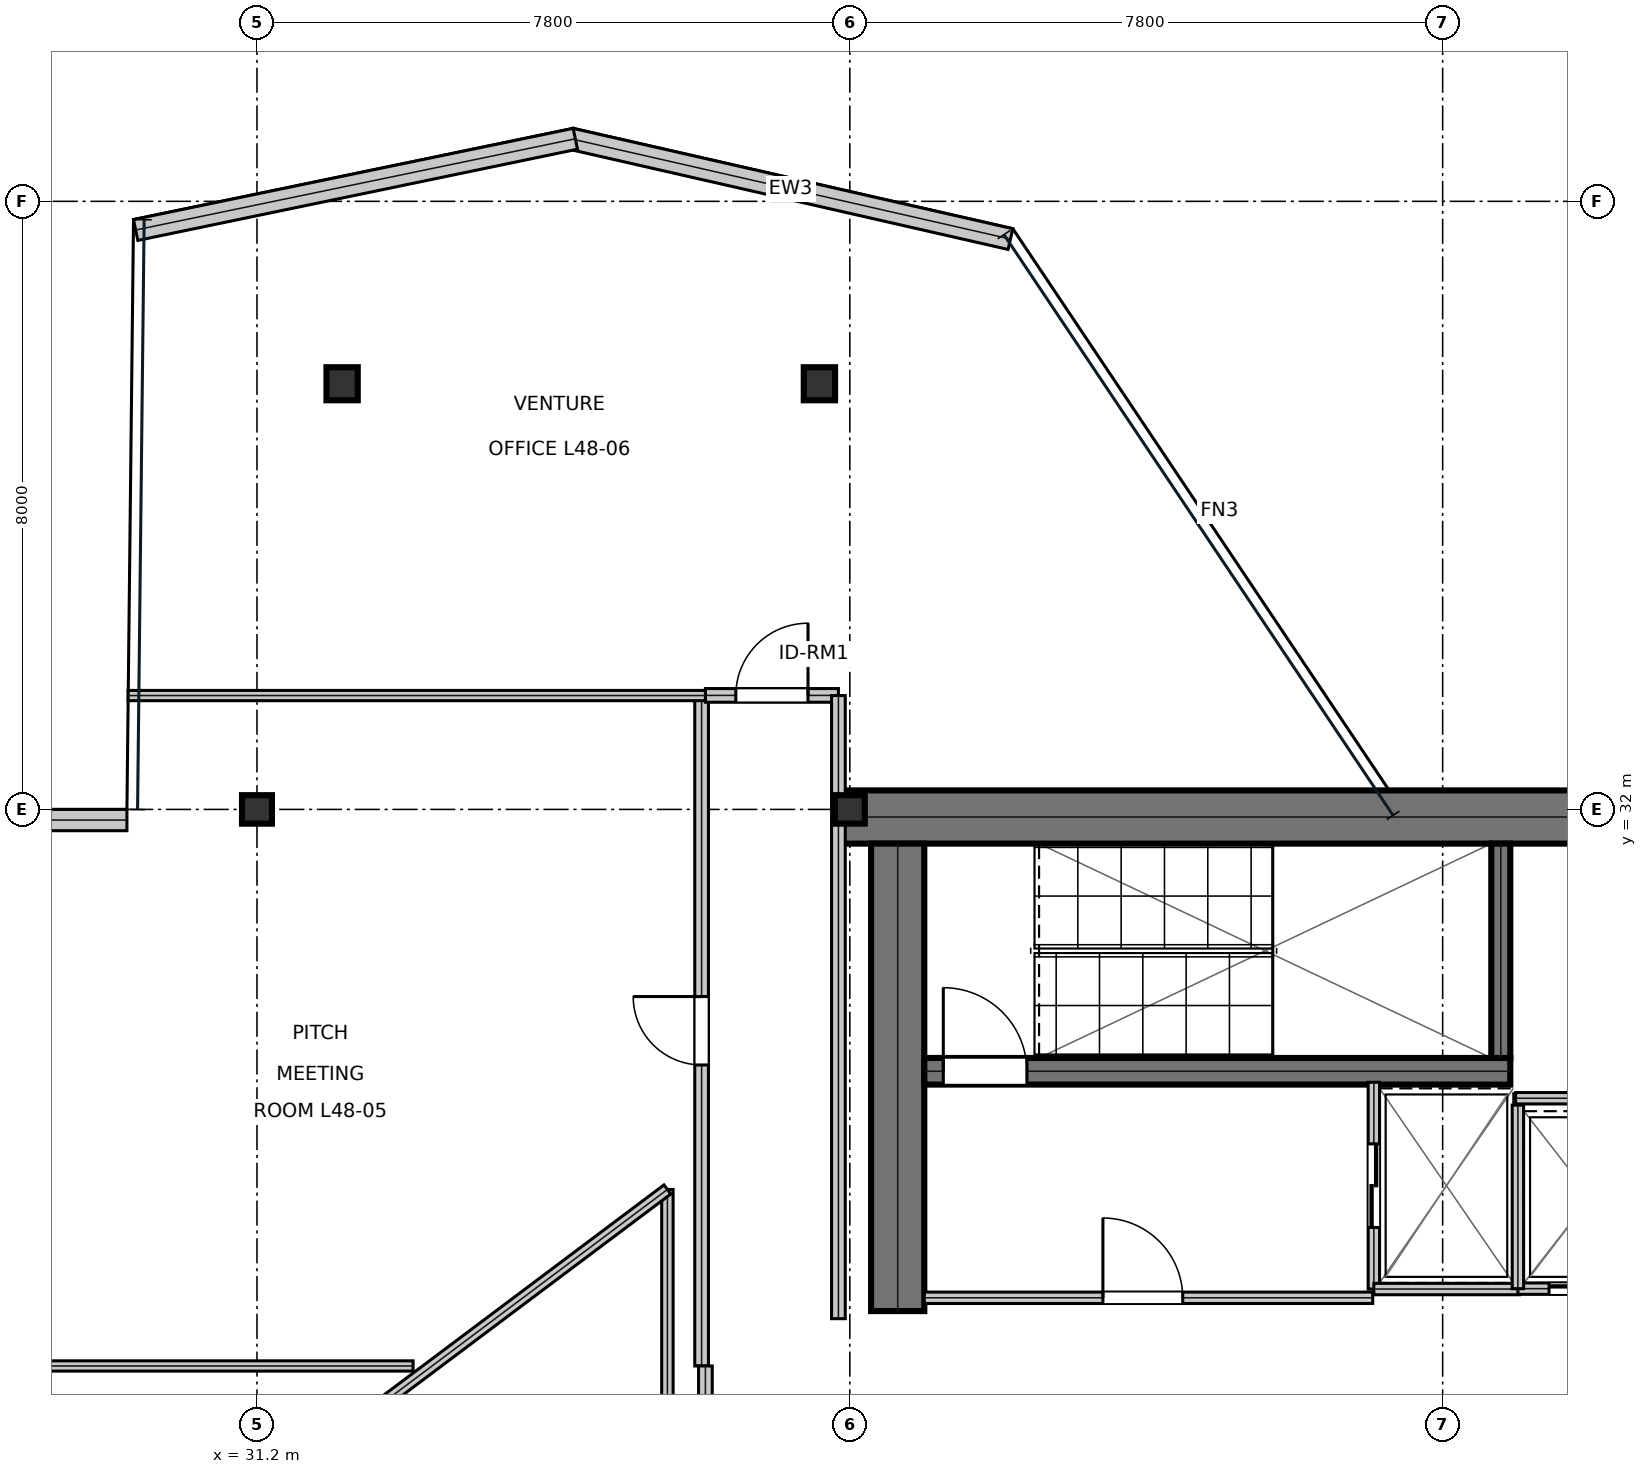
"""IFC4 building model, lengths in metres.
Left out: names, types, materials, properties, quantities, classifications, styles, units other than length and angle.
Written with IfcOpenShell. Run it as: python <this file> out.ifc"""

import sys

from ifc_helpers import new_model, si_unit, direction, frame, frame_2d, origin, origin_2d, place, context, subcontext, project, spatial, rectangle, i_section, extrude, element, fill, save


model = new_model("IFC4")
c1 = context("Model", 3, precision=1e-05, world=origin(), true_north=direction((0.0, 1.0)))
c2 = subcontext(c1, "Body", "Model", "MODEL_VIEW")
j1 = project(units=[si_unit("LENGTHUNIT", "METRE"), si_unit("PLANEANGLEUNIT", "RADIAN")], contexts=[c1])
p1 = place(None, origin())
s1 = spatial("IfcSite", under=j1, at=p1, CompositionType="ELEMENT")
p2 = place(p1, origin())
s2 = spatial("IfcBuilding", under=s1, at=p2, CompositionType="ELEMENT")
p3 = place(p2, frame((0.0, 0.0, 208.05)))
s3 = spatial("IfcBuildingStorey", under=s2, at=p3, CompositionType="ELEMENT", Elevation=208.05)
p4 = place(p3, frame((38.8, 31.9, 0.0), z_axis=(0.0, 0.0, 1.0), x_axis=(1.0, 0.0, 0.0)))
e1 = element("IfcWall", 1, at=p4, inside=s3, PredefinedType="SHEAR", context=c2, shape_type="SweptSolid", body=[
    extrude(rectangle(XDim=16.0, YDim=0.7, at=frame_2d((8.0, 0.0))), origin(), (0.0, 0.0, 1.0), 3.79),
])
p5 = place(p3, frame((39.63, 25.4, 0.0), z_axis=(0.0, 0.0, 1.0), x_axis=(0.0, 1.0, 0.0)))
e2 = element("IfcWall", 2, at=p5, inside=s3, PredefinedType="SHEAR", context=c2, shape_type="SweptSolid", body=[
    extrude(rectangle(XDim=6.15, YDim=0.7, at=frame_2d((3.075, 0.0))), origin(), (0.0, 0.0, 1.0), 3.79),
])
p6 = place(p3, frame((39.98, 28.555, 0.0), z_axis=(0.0, 0.0, 1.0), x_axis=(1.0, 0.0, 0.0)))
e3 = element("IfcWall", 3, at=p6, inside=s3, PredefinedType="SHEAR", context=c2, shape_type="SweptSolid", body=[
    extrude(rectangle(XDim=7.71, YDim=0.35, at=frame_2d((3.855, 0.0))), origin(), (0.0, 0.0, 1.0), 3.79),
])
p7 = place(p6, frame((0.25, 0.0, 0.0)))
e4 = element("IfcOpeningElement", 4, at=p7, cuts=e3, PredefinedType="OPENING", context=c2, shape_type="SweptSolid", body=[
    extrude(rectangle(XDim=1.1, YDim=2.15, at=frame_2d((0.55, 1.075))), frame((0.0, 0.185, 0.0), z_axis=(0.0, -1.0, 0.0), x_axis=(1.0, 0.0, 0.0)), (0.0, 0.0, 1.0), 0.37),
])
p8 = place(p3, frame((47.565, 28.73, 0.0), z_axis=(0.0, 0.0, 1.0), x_axis=(0.0, 1.0, 0.0)))
e5 = element("IfcWall", 5, at=p8, inside=s3, PredefinedType="SHEAR", context=c2, shape_type="SweptSolid", body=[
    extrude(rectangle(XDim=2.82, YDim=0.25, at=frame_2d((1.41, 0.0))), origin(), (0.0, 0.0, 1.0), 3.79),
])
for number, where, z_axis, x_axis in (
    (6, (31.2, 32.0, 0.0), (0.0, 0.0, 1.0), (1.0, 0.0, 0.0)),
    (7, (39.0, 32.0, 0.0), (0.0, 0.0, 1.0), (1.0, 0.0, 0.0)),
):
    element("IfcColumn", number, at=place(p3, frame(where, z_axis=z_axis, x_axis=x_axis)), inside=s3, PredefinedType="COLUMN", context=c2, shape_type="SweptSolid", body=[
        extrude(i_section(OverallWidth=0.394, OverallDepth=0.375, WebThickness=0.017, FlangeThickness=0.028, at=origin_2d()), origin(), (0.0, 0.0, 1.0), 4.044),
    ])
for number, where, z_axis, x_axis in (
    (8, (32.32, 37.6, 0.016), (0.0, 0.0, 1.0), (1.0, 0.0, 0.0)),
    (9, (38.6, 37.6, 0.016), (0.0, 0.0, 1.0), (1.0, 0.0, 0.0)),
):
    element("IfcColumn", number, at=place(p3, frame(where, z_axis=z_axis, x_axis=x_axis)), inside=s3, PredefinedType="COLUMN", context=c2, shape_type="SweptSolid", body=[
        extrude(i_section(OverallWidth=0.412, OverallDepth=0.435, WebThickness=0.036, FlangeThickness=0.058, at=origin_2d()), origin(), (0.0, 0.0, 1.0), 4.018),
    ])
p9 = place(p3, frame((41.113, 39.503, 0.0), z_axis=(0.0, 0.0, 1.0), x_axis=(-0.974934808954, 0.222490715064, 0.0)))
e10 = element("IfcWall", 10, at=p9, inside=s3, PredefinedType="STANDARD", context=c2, shape_type="SweptSolid", body=[
    extrude(rectangle(XDim=5.933, YDim=0.28, at=frame_2d((2.967, 0.0))), origin(), (0.0, 0.0, 1.0), 3.79),
])
p10 = place(p3, frame((35.388, 40.823, 0.0), z_axis=(0.0, 0.0, 1.0), x_axis=(-0.979145472124, -0.203160390873, 0.0)))
e11 = element("IfcWall", 11, at=p10, inside=s3, PredefinedType="STANDARD", context=c2, shape_type="SweptSolid", body=[
    extrude(rectangle(XDim=5.908, YDim=0.28, at=frame_2d((2.954, 0.0))), origin(), (0.0, 0.0, 1.0), 3.79),
])
p11 = place(p3, frame((29.489, 31.86, 0.0), z_axis=(0.0, 0.0, 1.0), x_axis=(-1.0, 0.0, 0.0)))
e12 = element("IfcWall", 12, at=p11, inside=s3, PredefinedType="STANDARD", context=c2, shape_type="SweptSolid", body=[
    extrude(rectangle(XDim=2.809, YDim=0.28, at=frame_2d((1.405, 0.0))), origin(), (0.0, 0.0, 1.0), 3.79),
])
p12 = place(p3, frame((39.98, 25.575, 0.0), z_axis=(0.0, 0.0, 1.0), x_axis=(1.0, 0.0, 0.0)))
e13 = element("IfcWall", 13, at=p12, inside=s3, PredefinedType="PARTITIONING", context=c2, shape_type="SweptSolid", body=[
    extrude(rectangle(XDim=5.9, YDim=0.15, at=frame_2d((2.95, 0.0))), origin(), (0.0, 0.0, 1.0), 3.79),
])
p13 = place(p12, frame((2.35, 0.0, 0.0)))
e14 = element("IfcOpeningElement", 14, at=p13, cuts=e13, PredefinedType="OPENING", context=c2, shape_type="SweptSolid", body=[
    extrude(rectangle(XDim=1.05, YDim=2.15, at=frame_2d((0.525, 1.075))), frame((0.0, 0.085, 0.0), z_axis=(0.0, -1.0, 0.0), x_axis=(1.0, 0.0, 0.0)), (0.0, 0.0, 1.0), 0.17),
])
p14 = place(p3, frame((45.895, 25.69, 0.0), z_axis=(0.0, 0.0, 1.0), x_axis=(0.0, 1.0, 0.0)))
e15 = element("IfcWall", 15, at=p14, inside=s3, PredefinedType="PARTITIONING", context=c2, shape_type="SweptSolid", body=[
    extrude(rectangle(XDim=2.72, YDim=0.15, at=frame_2d((1.36, 0.0))), origin(), (0.0, 0.0, 1.0), 3.79),
])
p15 = place(p14, frame((0.81, 0.0, 0.0)))
e16 = element("IfcOpeningElement", 16, at=p15, cuts=e15, PredefinedType="OPENING", context=c2, shape_type="SweptSolid", body=[
    extrude(rectangle(XDim=1.1, YDim=2.15, at=frame_2d((0.55, 1.075))), frame((0.0, 0.085, 0.0), z_axis=(0.0, -1.0, 0.0), x_axis=(1.0, 0.0, 0.0)), (0.0, 0.0, 1.0), 0.17),
])
p16 = place(p3, frame((45.895, 25.69, 0.0), z_axis=(0.0, 0.0, 1.0), x_axis=(1.0, 0.0, 0.0)))
e17 = element("IfcWall", 17, at=p16, inside=s3, PredefinedType="PARTITIONING", context=c2, shape_type="SweptSolid", body=[
    extrude(rectangle(XDim=1.915, YDim=0.15, at=frame_2d((0.958, 0.0))), origin(), (0.0, 0.0, 1.0), 3.79),
])
p17 = place(p3, frame((47.79, 25.695, 0.0), z_axis=(0.0, 0.0, 1.0), x_axis=(1.0, 0.0, 0.0)))
e18 = element("IfcWall", 18, at=p17, inside=s3, PredefinedType="PARTITIONING", context=c2, shape_type="SweptSolid", body=[
    extrude(rectangle(XDim=1.92, YDim=0.15, at=frame_2d((0.96, 0.0))), origin(), (0.0, 0.0, 1.0), 3.79),
])
p18 = place(p17, frame((0.41, 0.0, 0.0)))
e19 = element("IfcOpeningElement", 19, at=p18, cuts=e18, PredefinedType="OPENING", context=c2, shape_type="SweptSolid", body=[
    extrude(rectangle(XDim=1.1, YDim=2.15, at=frame_2d((0.55, 1.075))), frame((0.0, 0.085, 0.0), z_axis=(0.0, -1.0, 0.0), x_axis=(1.0, 0.0, 0.0)), (0.0, 0.0, 1.0), 0.17),
])
p19 = place(p3, frame((47.79, 25.695, 0.0), z_axis=(0.0, 0.0, 1.0), x_axis=(0.0, 1.0, 0.0)))
e20 = element("IfcWall", 20, at=p19, inside=s3, PredefinedType="PARTITIONING", context=c2, shape_type="SweptSolid", body=[
    extrude(rectangle(XDim=2.415, YDim=0.15, at=frame_2d((1.208, 0.0))), origin(), (0.0, 0.0, 1.0), 3.79),
])
p20 = place(p3, frame((47.76, 28.2, 0.0), z_axis=(0.0, 0.0, 1.0), x_axis=(1.0, 0.0, 0.0)))
e21 = element("IfcWall", 21, at=p20, inside=s3, PredefinedType="PARTITIONING", context=c2, shape_type="SweptSolid", body=[
    extrude(rectangle(XDim=2.04, YDim=0.15, at=frame_2d((1.02, 0.0))), origin(), (0.0, 0.0, 1.0), 3.79),
])
p21 = place(p3, frame((37.05, 24.678, 0.0), z_axis=(0.0, 0.0, 1.0), x_axis=(0.0, 1.0, 0.0)))
e22 = element("IfcWall", 22, at=p21, inside=s3, PredefinedType="SOLIDWALL", context=c2, shape_type="SweptSolid", body=[
    extrude(rectangle(XDim=8.82, YDim=0.18, at=frame_2d((4.41, 0.0))), origin(), (0.0, 0.0, 1.0), 3.241),
])
p22 = place(p21, frame((3.96, 0.0, 0.0)))
e23 = element("IfcOpeningElement", 23, at=p22, cuts=e22, PredefinedType="OPENING", context=c2, shape_type="SweptSolid", body=[
    extrude(rectangle(XDim=0.9, YDim=2.15, at=frame_2d((0.45, 1.075))), frame((0.0, 0.1, 0.0), z_axis=(0.0, -1.0, 0.0), x_axis=(1.0, 0.0, 0.0)), (0.0, 0.0, 1.0), 0.2),
])
p23 = place(p3, frame((37.1, 33.5, 0.0), z_axis=(0.0, 0.0, 1.0), x_axis=(1.0, 0.0, 0.0)))
e24 = element("IfcWall", 24, at=p23, inside=s3, PredefinedType="SOLIDWALL", context=c2, shape_type="SweptSolid", body=[
    extrude(rectangle(XDim=1.75, YDim=0.18, at=frame_2d((0.875, 0.0))), origin(), (0.0, 0.0, 1.0), 3.241),
])
p24 = place(p23, frame((0.4, 0.0, 0.0)))
e25 = element("IfcOpeningElement", 25, at=p24, cuts=e24, PredefinedType="OPENING", context=c2, shape_type="SweptSolid", body=[
    extrude(rectangle(XDim=0.95, YDim=2.15, at=frame_2d((0.475, 1.075))), frame((0.0, 0.1, 0.0), z_axis=(0.0, -1.0, 0.0), x_axis=(1.0, 0.0, 0.0)), (0.0, 0.0, 1.0), 0.2),
])
p25 = place(p3, frame((37.1, 20.6, 0.0), z_axis=(0.0, 0.0, 1.0), x_axis=(0.0, 1.0, 0.0)))
e26 = element("IfcWall", 26, at=p25, inside=s3, PredefinedType="SOLIDWALL", context=c2, shape_type="SweptSolid", body=[
    extrude(rectangle(XDim=4.078, YDim=0.18, at=frame_2d((2.039, 0.0))), origin(), (0.0, 0.0, 1.0), 3.79),
])
p26 = place(p3, frame((38.85, 25.3, 0.0), z_axis=(0.0, 0.0, 1.0), x_axis=(0.0, 1.0, 0.0)))
e27 = element("IfcWall", 27, at=p26, inside=s3, PredefinedType="SOLIDWALL", context=c2, shape_type="SweptSolid", body=[
    extrude(rectangle(XDim=8.198, YDim=0.18, at=frame_2d((4.099, 0.0))), origin(), (0.0, 0.0, 1.0), 3.241),
])
p27 = place(p3, frame((26.4, 24.678, 0.0), z_axis=(0.0, 0.0, 1.0), x_axis=(1.0, 0.0, 0.0)))
e28 = element("IfcWall", 28, at=p27, inside=s3, PredefinedType="PARTITIONING", context=c2, shape_type="SweptSolid", body=[
    extrude(rectangle(XDim=6.854, YDim=0.135, at=frame_2d((3.427, 0.0))), origin(), (0.0, 0.0, 1.0), 3.241),
])
p28 = place(p3, frame((29.506, 33.498, 0.0), z_axis=(0.0, 0.0, 1.0), x_axis=(1.0, 0.0, 0.0)))
e29 = element("IfcWall", 29, at=p28, inside=s3, PredefinedType="PARTITIONING", context=c2, shape_type="SweptSolid", body=[
    extrude(rectangle(XDim=7.594, YDim=0.135, at=frame_2d((3.797, 0.0))), origin(), (0.0, 0.0, 1.0), 3.319),
])
p29 = place(p3, frame((36.6, 21.0, 0.0), z_axis=(0.0, 0.0, 1.0), x_axis=(0.0, 1.0, 0.0)))
e30 = element("IfcWall", 30, at=p29, inside=s3, PredefinedType="MOVABLE", context=c2, shape_type="SweptSolid", body=[
    extrude(rectangle(XDim=6.0, YDim=0.15, at=frame_2d((3.0, 0.0))), origin(), (0.0, 0.0, 1.0), 3.79),
])
p30 = place(p3, frame((36.6, 27.0, 0.0), z_axis=(0.0, 0.0, 1.0), x_axis=(-0.8, -0.6, 0.0)))
e31 = element("IfcWall", 31, at=p30, inside=s3, PredefinedType="MOVABLE", context=c2, shape_type="SweptSolid", body=[
    extrude(rectangle(XDim=5.0, YDim=0.15, at=frame_2d((2.5, 0.0))), origin(), (0.0, 0.0, 1.0), 3.79),
])
p31 = place(p13, origin())
e32 = element("IfcDoor", 32, at=p31, inside=s3, OperationType="SINGLE_SWING_LEFT", PredefinedType="DOOR", context=c2, shape_type="SweptSolid", body=[
    extrude(rectangle(XDim=1.05, YDim=2.15, at=frame_2d((0.525, 1.075))), frame((0.0, 0.025, 0.0), z_axis=(0.0, -1.0, 0.0), x_axis=(1.0, 0.0, 0.0)), (0.0, 0.0, 1.0), 0.05),
])
fill(e14, e32)
p32 = place(p15, frame((1.1, 0.0, 0.0), z_axis=(0.0, 0.0, 1.0), x_axis=(-1.0, 0.0, 0.0)))
e33 = element("IfcDoor", 33, at=p32, inside=s3, OperationType="DOUBLE_DOOR_SLIDING", PredefinedType="DOOR", context=c2, shape_type="SweptSolid", body=[
    extrude(rectangle(XDim=1.1, YDim=2.15, at=frame_2d((0.55, 1.075))), frame((0.0, 0.025, 0.0), z_axis=(0.0, -1.0, 0.0), x_axis=(1.0, 0.0, 0.0)), (0.0, 0.0, 1.0), 0.05),
])
fill(e16, e33)
p33 = place(p18, frame((1.1, 0.0, 0.0), z_axis=(0.0, 0.0, 1.0), x_axis=(-1.0, 0.0, 0.0)))
e34 = element("IfcDoor", 34, at=p33, inside=s3, OperationType="DOUBLE_DOOR_SLIDING", PredefinedType="DOOR", context=c2, shape_type="SweptSolid", body=[
    extrude(rectangle(XDim=1.1, YDim=2.15, at=frame_2d((0.55, 1.075))), frame((0.0, 0.025, 0.0), z_axis=(0.0, -1.0, 0.0), x_axis=(1.0, 0.0, 0.0)), (0.0, 0.0, 1.0), 0.05),
])
fill(e19, e34)
p34 = place(p22, origin())
e35 = element("IfcDoor", 35, at=p34, inside=s3, OperationType="SINGLE_SWING_RIGHT", PredefinedType="DOOR", context=c2, shape_type="SweptSolid", body=[
    extrude(rectangle(XDim=0.9, YDim=2.15, at=frame_2d((0.45, 1.075))), frame((0.0, 0.025, 0.0), z_axis=(0.0, -1.0, 0.0), x_axis=(1.0, 0.0, 0.0)), (0.0, 0.0, 1.0), 0.05),
])
fill(e23, e35)
p35 = place(p24, origin())
e36 = element("IfcDoor", 36, at=p35, inside=s3, OperationType="SINGLE_SWING_RIGHT", PredefinedType="DOOR", context=c2, shape_type="SweptSolid", body=[
    extrude(rectangle(XDim=0.95, YDim=2.15, at=frame_2d((0.475, 1.075))), frame((0.0, 0.025, 0.0), z_axis=(0.0, -1.0, 0.0), x_axis=(1.0, 0.0, 0.0)), (0.0, 0.0, 1.0), 0.05),
])
fill(e25, e36)
p36 = place(p7, origin())
e37 = element("IfcDoor", 37, at=p36, inside=s3, OperationType="SINGLE_SWING_LEFT", PredefinedType="DOOR", context=c2, shape_type="SweptSolid", body=[
    extrude(rectangle(XDim=1.1, YDim=2.15, at=frame_2d((0.55, 1.075))), frame((0.0, 0.025, 0.0), z_axis=(0.0, -1.0, 0.0), x_axis=(1.0, 0.0, 0.0)), (0.0, 0.0, 1.0), 0.05),
])
fill(e4, e37)
save(model, sys.argv[1])
